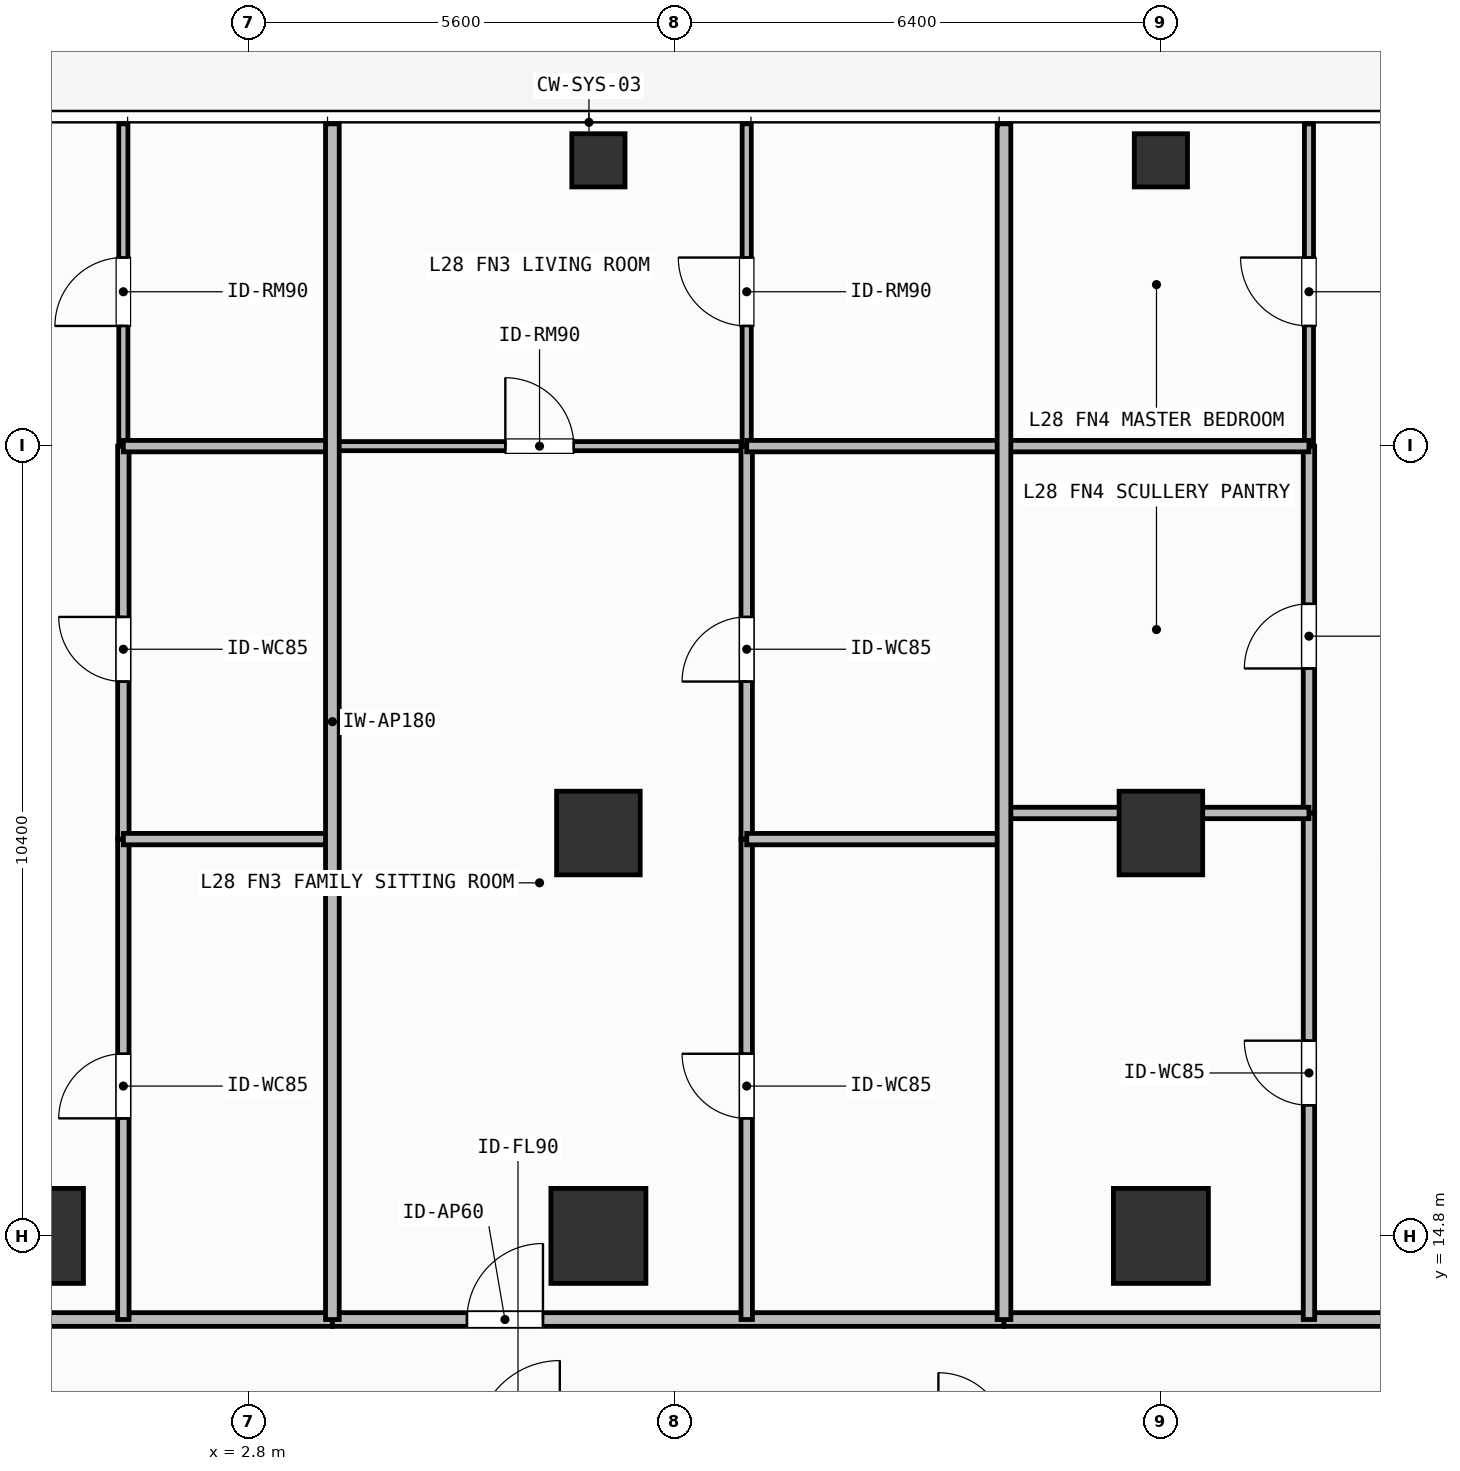
"""IFC4 building model, lengths in metres.
Left out: names, types, materials, properties, quantities, classifications, styles, units other than length and angle.
Written with IfcOpenShell. Run it as: python <this file> out.ifc"""

import sys

from ifc_helpers import new_model, si_unit, direction, frame, frame_2d, origin, origin_2d, place, context, subcontext, project, spatial, rectangle, hollow_rectangle, extrude, element, fill, save


model = new_model("IFC4")
c1 = context("Model", 3, precision=1e-05, world=origin(), true_north=direction((0.0, 1.0)))
c2 = subcontext(c1, "Body", "Model", "MODEL_VIEW")
j1 = project(units=[si_unit("LENGTHUNIT", "METRE"), si_unit("PLANEANGLEUNIT", "RADIAN")], contexts=[c1])
p1 = place(None, origin())
s1 = spatial("IfcSite", under=j1, at=p1, CompositionType="ELEMENT")
p2 = place(p1, origin())
s2 = spatial("IfcBuilding", under=s1, at=p2, CompositionType="ELEMENT")
p3 = place(p2, frame((0.0, 0.0, 113.4)))
s3 = spatial("IfcBuildingStorey", under=s2, at=p3, CompositionType="ELEMENT", Elevation=113.4)
for number, where, z_axis, x_axis in (
    (1, (0.0, 14.8, 0.0), (0.0, 0.0, 1.0), (1.0, 0.0, 0.0)),
    (2, (7.4, 14.8, 0.0), (0.0, 0.0, 1.0), (1.0, 0.0, 0.0)),
    (3, (14.8, 14.8, 0.0), (0.0, 0.0, 1.0), (1.0, 0.0, 0.0)),
):
    element("IfcColumn", number, at=place(p3, frame(where, z_axis=z_axis, x_axis=x_axis)), inside=s3, PredefinedType="COLUMN", context=c2, shape_type="SweptSolid", body=[
        extrude(rectangle(XDim=1.25, YDim=1.25, at=origin_2d()), origin(), (0.0, 0.0, 1.0), 3.9),
    ])
for number, where, z_axis, x_axis in (
    (4, (7.4, 20.1, 0.0), (0.0, 0.0, 1.0), (1.0, 0.0, 0.0)),
    (5, (14.8, 20.1, 0.0), (0.0, 0.0, 1.0), (1.0, 0.0, 0.0)),
):
    element("IfcColumn", number, at=place(p3, frame(where, z_axis=z_axis, x_axis=x_axis)), inside=s3, PredefinedType="COLUMN", context=c2, shape_type="SweptSolid", body=[
        extrude(rectangle(XDim=1.1, YDim=1.1, at=origin_2d()), origin(), (0.0, 0.0, 1.0), 3.9),
    ])
for number, where, z_axis, x_axis in (
    (6, (7.4, 28.95, 0.0), (0.0, 0.0, 1.0), (1.0, 0.0, 0.0)),
    (7, (14.8, 28.95, 0.0), (0.0, 0.0, 1.0), (1.0, 0.0, 0.0)),
):
    element("IfcColumn", number, at=place(p3, frame(where, z_axis=z_axis, x_axis=x_axis)), inside=s3, PredefinedType="COLUMN", context=c2, shape_type="SweptSolid", body=[
        extrude(hollow_rectangle(XDim=0.7, YDim=0.7, WallThickness=0.032, at=origin_2d()), origin(), (0.0, 0.0, 1.0), 3.9),
    ])
p4 = place(p3, frame((-3.379, 13.7, 0.0), z_axis=(0.0, 0.0, 1.0), x_axis=(1.0, 0.0, 0.0)))
e8 = element("IfcWall", 8, at=p4, inside=s3, PredefinedType="PARTITIONING", context=c2, shape_type="SweptSolid", body=[
    extrude(rectangle(XDim=7.279, YDim=0.18, at=frame_2d((3.639, 0.0))), origin(), (0.0, 0.0, 1.0), 3.68),
])
p5 = place(p4, frame((1.562, 0.0, 0.0)))
e9 = element("IfcOpeningElement", 9, at=p5, cuts=e8, PredefinedType="OPENING", context=c2, shape_type="SweptSolid", body=[
    extrude(rectangle(XDim=1.0, YDim=2.2, at=frame_2d((0.5, 1.1))), frame((0.0, 0.1, 0.0), z_axis=(0.0, -1.0, 0.0), x_axis=(1.0, 0.0, 0.0)), (0.0, 0.0, 1.0), 0.2),
])
p6 = place(p3, frame((1.15, 13.7, 0.0), z_axis=(0.0, 0.0, 1.0), x_axis=(0.0, 1.0, 0.0)))
e10 = element("IfcWall", 10, at=p6, inside=s3, PredefinedType="PARTITIONING", context=c2, shape_type="SweptSolid", body=[
    extrude(rectangle(XDim=6.32, YDim=0.15, at=frame_2d((3.16, 0.0))), origin(), (0.0, 0.0, 1.0), 3.68),
])
p7 = place(p6, frame((2.646, 0.0, 0.0)))
e11 = element("IfcOpeningElement", 11, at=p7, cuts=e10, PredefinedType="OPENING", context=c2, shape_type="SweptSolid", body=[
    extrude(rectangle(XDim=0.85, YDim=2.1, at=frame_2d((0.425, 1.05))), frame((0.0, 0.085, 0.0), z_axis=(0.0, -1.0, 0.0), x_axis=(1.0, 0.0, 0.0)), (0.0, 0.0, 1.0), 0.17),
])
p8 = place(p3, frame((1.15, 20.02, 0.0), z_axis=(0.0, 0.0, 1.0), x_axis=(0.0, 1.0, 0.0)))
e12 = element("IfcWall", 12, at=p8, inside=s3, PredefinedType="PARTITIONING", context=c2, shape_type="SweptSolid", body=[
    extrude(rectangle(XDim=5.17, YDim=0.15, at=frame_2d((2.585, 0.0))), origin(), (0.0, 0.0, 1.0), 3.68),
])
p9 = place(p8, frame((2.073, 0.0, 0.0)))
e13 = element("IfcOpeningElement", 13, at=p9, cuts=e12, PredefinedType="OPENING", context=c2, shape_type="SweptSolid", body=[
    extrude(rectangle(XDim=0.85, YDim=2.1, at=frame_2d((0.425, 1.05))), frame((0.0, 0.085, 0.0), z_axis=(0.0, -1.0, 0.0), x_axis=(1.0, 0.0, 0.0)), (0.0, 0.0, 1.0), 0.17),
])
p10 = place(p3, frame((1.15, 25.19, 0.0), z_axis=(0.0, 0.0, 1.0), x_axis=(0.0, 1.0, 0.0)))
e14 = element("IfcWall", 14, at=p10, inside=s3, PredefinedType="PARTITIONING", context=c2, shape_type="SweptSolid", body=[
    extrude(rectangle(XDim=4.24, YDim=0.12, at=frame_2d((2.12, 0.0))), origin(), (0.0, 0.0, 1.0), 3.68),
])
p11 = place(p10, frame((1.581, 0.0, 0.0)))
e15 = element("IfcOpeningElement", 15, at=p11, cuts=e14, PredefinedType="OPENING", context=c2, shape_type="SweptSolid", body=[
    extrude(rectangle(XDim=0.9, YDim=2.1, at=frame_2d((0.45, 1.05))), frame((0.0, 0.07, 0.0), z_axis=(0.0, -1.0, 0.0), x_axis=(1.0, 0.0, 0.0)), (0.0, 0.0, 1.0), 0.14),
])
p12 = place(p3, frame((3.9, 13.7, 0.0), z_axis=(0.0, 0.0, 1.0), x_axis=(1.0, 0.0, 0.0)))
e16 = element("IfcWall", 16, at=p12, inside=s3, PredefinedType="PARTITIONING", context=c2, shape_type="SweptSolid", body=[
    extrude(rectangle(XDim=8.836, YDim=0.18, at=frame_2d((4.418, 0.0))), origin(), (0.0, 0.0, 1.0), 3.68),
])
p13 = place(p12, frame((1.771, 0.0, 0.0)))
e17 = element("IfcOpeningElement", 17, at=p13, cuts=e16, PredefinedType="OPENING", context=c2, shape_type="SweptSolid", body=[
    extrude(rectangle(XDim=1.0, YDim=2.2, at=frame_2d((0.5, 1.1))), frame((0.0, 0.1, 0.0), z_axis=(0.0, -1.0, 0.0), x_axis=(1.0, 0.0, 0.0)), (0.0, 0.0, 1.0), 0.2),
])
p14 = place(p3, frame((3.9, 25.19, 0.0), z_axis=(0.0, 0.0, 1.0), x_axis=(1.0, 0.0, 0.0)))
e18 = element("IfcWall", 18, at=p14, inside=s3, PredefinedType="PARTITIONING", context=c2, shape_type="SweptSolid", body=[
    extrude(rectangle(XDim=5.451, YDim=0.12, at=frame_2d((2.726, 0.0))), origin(), (0.0, 0.0, 1.0), 3.68),
])
p15 = place(p14, frame((2.275, 0.0, 0.0)))
e19 = element("IfcOpeningElement", 19, at=p15, cuts=e18, PredefinedType="OPENING", context=c2, shape_type="SweptSolid", body=[
    extrude(rectangle(XDim=0.9, YDim=2.1, at=frame_2d((0.45, 1.05))), frame((0.0, 0.07, 0.0), z_axis=(0.0, -1.0, 0.0), x_axis=(1.0, 0.0, 0.0)), (0.0, 0.0, 1.0), 0.14),
])
p16 = place(p3, frame((9.351, 13.7, 0.0), z_axis=(0.0, 0.0, 1.0), x_axis=(0.0, 1.0, 0.0)))
e20 = element("IfcWall", 20, at=p16, inside=s3, PredefinedType="PARTITIONING", context=c2, shape_type="SweptSolid", body=[
    extrude(rectangle(XDim=6.32, YDim=0.15, at=frame_2d((3.16, 0.0))), origin(), (0.0, 0.0, 1.0), 3.68),
])
p17 = place(p16, frame((2.646, 0.0, 0.0)))
e21 = element("IfcOpeningElement", 21, at=p17, cuts=e20, PredefinedType="OPENING", context=c2, shape_type="SweptSolid", body=[
    extrude(rectangle(XDim=0.85, YDim=2.1, at=frame_2d((0.425, 1.05))), frame((0.0, 0.085, 0.0), z_axis=(0.0, -1.0, 0.0), x_axis=(1.0, 0.0, 0.0)), (0.0, 0.0, 1.0), 0.17),
])
p18 = place(p3, frame((9.351, 20.02, 0.0), z_axis=(0.0, 0.0, 1.0), x_axis=(0.0, 1.0, 0.0)))
e22 = element("IfcWall", 22, at=p18, inside=s3, PredefinedType="PARTITIONING", context=c2, shape_type="SweptSolid", body=[
    extrude(rectangle(XDim=5.17, YDim=0.15, at=frame_2d((2.585, 0.0))), origin(), (0.0, 0.0, 1.0), 3.68),
])
p19 = place(p18, frame((2.073, 0.0, 0.0)))
e23 = element("IfcOpeningElement", 23, at=p19, cuts=e22, PredefinedType="OPENING", context=c2, shape_type="SweptSolid", body=[
    extrude(rectangle(XDim=0.85, YDim=2.1, at=frame_2d((0.425, 1.05))), frame((0.0, 0.085, 0.0), z_axis=(0.0, -1.0, 0.0), x_axis=(1.0, 0.0, 0.0)), (0.0, 0.0, 1.0), 0.17),
])
p20 = place(p3, frame((9.351, 25.19, 0.0), z_axis=(0.0, 0.0, 1.0), x_axis=(0.0, 1.0, 0.0)))
e24 = element("IfcWall", 24, at=p20, inside=s3, PredefinedType="PARTITIONING", context=c2, shape_type="SweptSolid", body=[
    extrude(rectangle(XDim=4.24, YDim=0.12, at=frame_2d((2.12, 0.0))), origin(), (0.0, 0.0, 1.0), 3.68),
])
p21 = place(p20, frame((1.581, 0.0, 0.0)))
e25 = element("IfcOpeningElement", 25, at=p21, cuts=e24, PredefinedType="OPENING", context=c2, shape_type="SweptSolid", body=[
    extrude(rectangle(XDim=0.9, YDim=2.1, at=frame_2d((0.45, 1.05))), frame((0.0, 0.07, 0.0), z_axis=(0.0, -1.0, 0.0), x_axis=(1.0, 0.0, 0.0)), (0.0, 0.0, 1.0), 0.14),
])
p22 = place(p3, frame((12.736, 13.7, 0.0), z_axis=(0.0, 0.0, 1.0), x_axis=(1.0, 0.0, 0.0)))
e26 = element("IfcWall", 26, at=p22, inside=s3, PredefinedType="PARTITIONING", context=c2, shape_type="SweptSolid", body=[
    extrude(rectangle(XDim=11.384, YDim=0.18, at=frame_2d((5.692, 0.0))), origin(), (0.0, 0.0, 1.0), 3.68),
])
p23 = place(p22, frame((5.012, 0.0, 0.0)))
e27 = element("IfcOpeningElement", 27, at=p23, cuts=e26, PredefinedType="OPENING", context=c2, shape_type="SweptSolid", body=[
    extrude(rectangle(XDim=1.0, YDim=2.2, at=frame_2d((0.5, 1.1))), frame((0.0, 0.1, 0.0), z_axis=(0.0, -1.0, 0.0), x_axis=(1.0, 0.0, 0.0)), (0.0, 0.0, 1.0), 0.2),
])
p24 = place(p3, frame((16.748, 13.7, 0.0), z_axis=(0.0, 0.0, 1.0), x_axis=(0.0, 1.0, 0.0)))
e28 = element("IfcWall", 28, at=p24, inside=s3, PredefinedType="PARTITIONING", context=c2, shape_type="SweptSolid", body=[
    extrude(rectangle(XDim=6.664, YDim=0.15, at=frame_2d((3.332, 0.0))), origin(), (0.0, 0.0, 1.0), 3.68),
])
p25 = place(p24, frame((2.818, 0.0, 0.0)))
e29 = element("IfcOpeningElement", 29, at=p25, cuts=e28, PredefinedType="OPENING", context=c2, shape_type="SweptSolid", body=[
    extrude(rectangle(XDim=0.85, YDim=2.1, at=frame_2d((0.425, 1.05))), frame((0.0, 0.085, 0.0), z_axis=(0.0, -1.0, 0.0), x_axis=(1.0, 0.0, 0.0)), (0.0, 0.0, 1.0), 0.17),
])
p26 = place(p3, frame((16.748, 20.364, 0.0), z_axis=(0.0, 0.0, 1.0), x_axis=(0.0, 1.0, 0.0)))
e30 = element("IfcWall", 30, at=p26, inside=s3, PredefinedType="PARTITIONING", context=c2, shape_type="SweptSolid", body=[
    extrude(rectangle(XDim=4.826, YDim=0.15, at=frame_2d((2.413, 0.0))), origin(), (0.0, 0.0, 1.0), 3.68),
])
p27 = place(p26, frame((1.901, 0.0, 0.0)))
e31 = element("IfcOpeningElement", 31, at=p27, cuts=e30, PredefinedType="OPENING", context=c2, shape_type="SweptSolid", body=[
    extrude(rectangle(XDim=0.85, YDim=2.1, at=frame_2d((0.425, 1.05))), frame((0.0, 0.085, 0.0), z_axis=(0.0, -1.0, 0.0), x_axis=(1.0, 0.0, 0.0)), (0.0, 0.0, 1.0), 0.17),
])
p28 = place(p3, frame((16.748, 25.19, 0.0), z_axis=(0.0, 0.0, 1.0), x_axis=(0.0, 1.0, 0.0)))
e32 = element("IfcWall", 32, at=p28, inside=s3, PredefinedType="PARTITIONING", context=c2, shape_type="SweptSolid", body=[
    extrude(rectangle(XDim=4.24, YDim=0.12, at=frame_2d((2.12, 0.0))), origin(), (0.0, 0.0, 1.0), 3.68),
])
p29 = place(p28, frame((1.581, 0.0, 0.0)))
e33 = element("IfcOpeningElement", 33, at=p29, cuts=e32, PredefinedType="OPENING", context=c2, shape_type="SweptSolid", body=[
    extrude(rectangle(XDim=0.9, YDim=2.1, at=frame_2d((0.45, 1.05))), frame((0.0, 0.07, 0.0), z_axis=(0.0, -1.0, 0.0), x_axis=(1.0, 0.0, 0.0)), (0.0, 0.0, 1.0), 0.14),
])
p30 = place(p3, frame((1.15, 20.02, 0.0), z_axis=(0.0, 0.0, 1.0), x_axis=(1.0, 0.0, 0.0)))
e34 = element("IfcWall", 34, at=p30, inside=s3, PredefinedType="PARTITIONING", context=c2, shape_type="SweptSolid", body=[
    extrude(rectangle(XDim=2.75, YDim=0.15, at=frame_2d((1.375, 0.0))), origin(), (0.0, 0.0, 1.0), 3.082),
])
p31 = place(p3, frame((1.15, 25.19, 0.0), z_axis=(0.0, 0.0, 1.0), x_axis=(1.0, 0.0, 0.0)))
e35 = element("IfcWall", 35, at=p31, inside=s3, PredefinedType="PARTITIONING", context=c2, shape_type="SweptSolid", body=[
    extrude(rectangle(XDim=2.75, YDim=0.15, at=frame_2d((1.375, 0.0))), origin(), (0.0, 0.0, 1.0), 3.68),
])
p32 = place(p3, frame((9.351, 20.02, 0.0), z_axis=(0.0, 0.0, 1.0), x_axis=(1.0, 0.0, 0.0)))
e36 = element("IfcWall", 36, at=p32, inside=s3, PredefinedType="PARTITIONING", context=c2, shape_type="SweptSolid", body=[
    extrude(rectangle(XDim=3.385, YDim=0.15, at=frame_2d((1.692, 0.0))), origin(), (0.0, 0.0, 1.0), 3.082),
])
p33 = place(p3, frame((9.351, 25.19, 0.0), z_axis=(0.0, 0.0, 1.0), x_axis=(1.0, 0.0, 0.0)))
e37 = element("IfcWall", 37, at=p33, inside=s3, PredefinedType="PARTITIONING", context=c2, shape_type="SweptSolid", body=[
    extrude(rectangle(XDim=3.385, YDim=0.15, at=frame_2d((1.692, 0.0))), origin(), (0.0, 0.0, 1.0), 3.68),
])
p34 = place(p3, frame((3.9, 13.7, 0.0), z_axis=(0.0, 0.0, 1.0), x_axis=(0.0, 1.0, 0.0)))
e38 = element("IfcWall", 38, at=p34, inside=s3, PredefinedType="PARTITIONING", context=c2, shape_type="SweptSolid", body=[
    extrude(rectangle(XDim=15.73, YDim=0.18, at=frame_2d((7.865, 0.0))), origin(), (0.0, 0.0, 1.0), 3.68),
])
p35 = place(p3, frame((12.736, 20.364, 0.0), z_axis=(0.0, 0.0, 1.0), x_axis=(1.0, 0.0, 0.0)))
e39 = element("IfcWall", 39, at=p35, inside=s3, PredefinedType="PARTITIONING", context=c2, shape_type="SweptSolid", body=[
    extrude(rectangle(XDim=4.012, YDim=0.15, at=frame_2d((2.006, 0.0))), origin(), (0.0, 0.0, 1.0), 3.082),
])
p36 = place(p3, frame((12.736, 25.19, 0.0), z_axis=(0.0, 0.0, 1.0), x_axis=(1.0, 0.0, 0.0)))
e40 = element("IfcWall", 40, at=p36, inside=s3, PredefinedType="PARTITIONING", context=c2, shape_type="SweptSolid", body=[
    extrude(rectangle(XDim=4.012, YDim=0.15, at=frame_2d((2.006, 0.0))), origin(), (0.0, 0.0, 1.0), 3.68),
])
p37 = place(p3, frame((12.736, 13.7, 0.0), z_axis=(0.0, 0.0, 1.0), x_axis=(0.0, 1.0, 0.0)))
e41 = element("IfcWall", 41, at=p37, inside=s3, PredefinedType="PARTITIONING", context=c2, shape_type="SweptSolid", body=[
    extrude(rectangle(XDim=15.73, YDim=0.18, at=frame_2d((7.865, 0.0))), origin(), (0.0, 0.0, 1.0), 3.68),
])
p38 = place(p7, origin())
e42 = element("IfcDoor", 42, at=p38, inside=s3, OperationType="SINGLE_SWING_LEFT", PredefinedType="DOOR", context=c2, shape_type="SweptSolid", body=[
    extrude(rectangle(XDim=0.85, YDim=2.1, at=frame_2d((0.425, 1.05))), frame((0.0, 0.025, 0.0), z_axis=(0.0, -1.0, 0.0), x_axis=(1.0, 0.0, 0.0)), (0.0, 0.0, 1.0), 0.05),
])
fill(e11, e42)
p39 = place(p9, origin())
e43 = element("IfcDoor", 43, at=p39, inside=s3, OperationType="SINGLE_SWING_RIGHT", PredefinedType="DOOR", context=c2, shape_type="SweptSolid", body=[
    extrude(rectangle(XDim=0.85, YDim=2.1, at=frame_2d((0.425, 1.05))), frame((0.0, 0.025, 0.0), z_axis=(0.0, -1.0, 0.0), x_axis=(1.0, 0.0, 0.0)), (0.0, 0.0, 1.0), 0.05),
])
fill(e13, e43)
p40 = place(p11, origin())
e44 = element("IfcDoor", 44, at=p40, inside=s3, OperationType="SINGLE_SWING_LEFT", PredefinedType="DOOR", context=c2, shape_type="SweptSolid", body=[
    extrude(rectangle(XDim=0.9, YDim=2.1, at=frame_2d((0.45, 1.05))), frame((0.0, 0.025, 0.0), z_axis=(0.0, -1.0, 0.0), x_axis=(1.0, 0.0, 0.0)), (0.0, 0.0, 1.0), 0.05),
])
fill(e15, e44)
p41 = place(p13, origin())
e45 = element("IfcDoor", 45, at=p41, inside=s3, OperationType="SINGLE_SWING_RIGHT", PredefinedType="DOOR", context=c2, shape_type="SweptSolid", body=[
    extrude(rectangle(XDim=1.0, YDim=2.2, at=frame_2d((0.5, 1.1))), frame((0.0, 0.025, 0.0), z_axis=(0.0, -1.0, 0.0), x_axis=(1.0, 0.0, 0.0)), (0.0, 0.0, 1.0), 0.05),
])
fill(e17, e45)
p42 = place(p15, origin())
e46 = element("IfcDoor", 46, at=p42, inside=s3, OperationType="SINGLE_SWING_LEFT", PredefinedType="DOOR", context=c2, shape_type="SweptSolid", body=[
    extrude(rectangle(XDim=0.9, YDim=2.1, at=frame_2d((0.45, 1.05))), frame((0.0, 0.025, 0.0), z_axis=(0.0, -1.0, 0.0), x_axis=(1.0, 0.0, 0.0)), (0.0, 0.0, 1.0), 0.05),
])
fill(e19, e46)
p43 = place(p17, origin())
e47 = element("IfcDoor", 47, at=p43, inside=s3, OperationType="SINGLE_SWING_RIGHT", PredefinedType="DOOR", context=c2, shape_type="SweptSolid", body=[
    extrude(rectangle(XDim=0.85, YDim=2.1, at=frame_2d((0.425, 1.05))), frame((0.0, 0.025, 0.0), z_axis=(0.0, -1.0, 0.0), x_axis=(1.0, 0.0, 0.0)), (0.0, 0.0, 1.0), 0.05),
])
fill(e21, e47)
p44 = place(p19, origin())
e48 = element("IfcDoor", 48, at=p44, inside=s3, OperationType="SINGLE_SWING_LEFT", PredefinedType="DOOR", context=c2, shape_type="SweptSolid", body=[
    extrude(rectangle(XDim=0.85, YDim=2.1, at=frame_2d((0.425, 1.05))), frame((0.0, 0.025, 0.0), z_axis=(0.0, -1.0, 0.0), x_axis=(1.0, 0.0, 0.0)), (0.0, 0.0, 1.0), 0.05),
])
fill(e23, e48)
p45 = place(p21, origin())
e49 = element("IfcDoor", 49, at=p45, inside=s3, OperationType="SINGLE_SWING_RIGHT", PredefinedType="DOOR", context=c2, shape_type="SweptSolid", body=[
    extrude(rectangle(XDim=0.9, YDim=2.1, at=frame_2d((0.45, 1.05))), frame((0.0, 0.025, 0.0), z_axis=(0.0, -1.0, 0.0), x_axis=(1.0, 0.0, 0.0)), (0.0, 0.0, 1.0), 0.05),
])
fill(e25, e49)
p46 = place(p25, origin())
e50 = element("IfcDoor", 50, at=p46, inside=s3, OperationType="SINGLE_SWING_RIGHT", PredefinedType="DOOR", context=c2, shape_type="SweptSolid", body=[
    extrude(rectangle(XDim=0.85, YDim=2.1, at=frame_2d((0.425, 1.05))), frame((0.0, 0.025, 0.0), z_axis=(0.0, -1.0, 0.0), x_axis=(1.0, 0.0, 0.0)), (0.0, 0.0, 1.0), 0.05),
])
fill(e29, e50)
p47 = place(p27, origin())
e51 = element("IfcDoor", 51, at=p47, inside=s3, OperationType="SINGLE_SWING_LEFT", PredefinedType="DOOR", context=c2, shape_type="SweptSolid", body=[
    extrude(rectangle(XDim=0.85, YDim=2.1, at=frame_2d((0.425, 1.05))), frame((0.0, 0.025, 0.0), z_axis=(0.0, -1.0, 0.0), x_axis=(1.0, 0.0, 0.0)), (0.0, 0.0, 1.0), 0.05),
])
fill(e31, e51)
p48 = place(p29, origin())
e52 = element("IfcDoor", 52, at=p48, inside=s3, OperationType="SINGLE_SWING_RIGHT", PredefinedType="DOOR", context=c2, shape_type="SweptSolid", body=[
    extrude(rectangle(XDim=0.9, YDim=2.1, at=frame_2d((0.45, 1.05))), frame((0.0, 0.025, 0.0), z_axis=(0.0, -1.0, 0.0), x_axis=(1.0, 0.0, 0.0)), (0.0, 0.0, 1.0), 0.05),
])
fill(e33, e52)
save(model, sys.argv[1])
